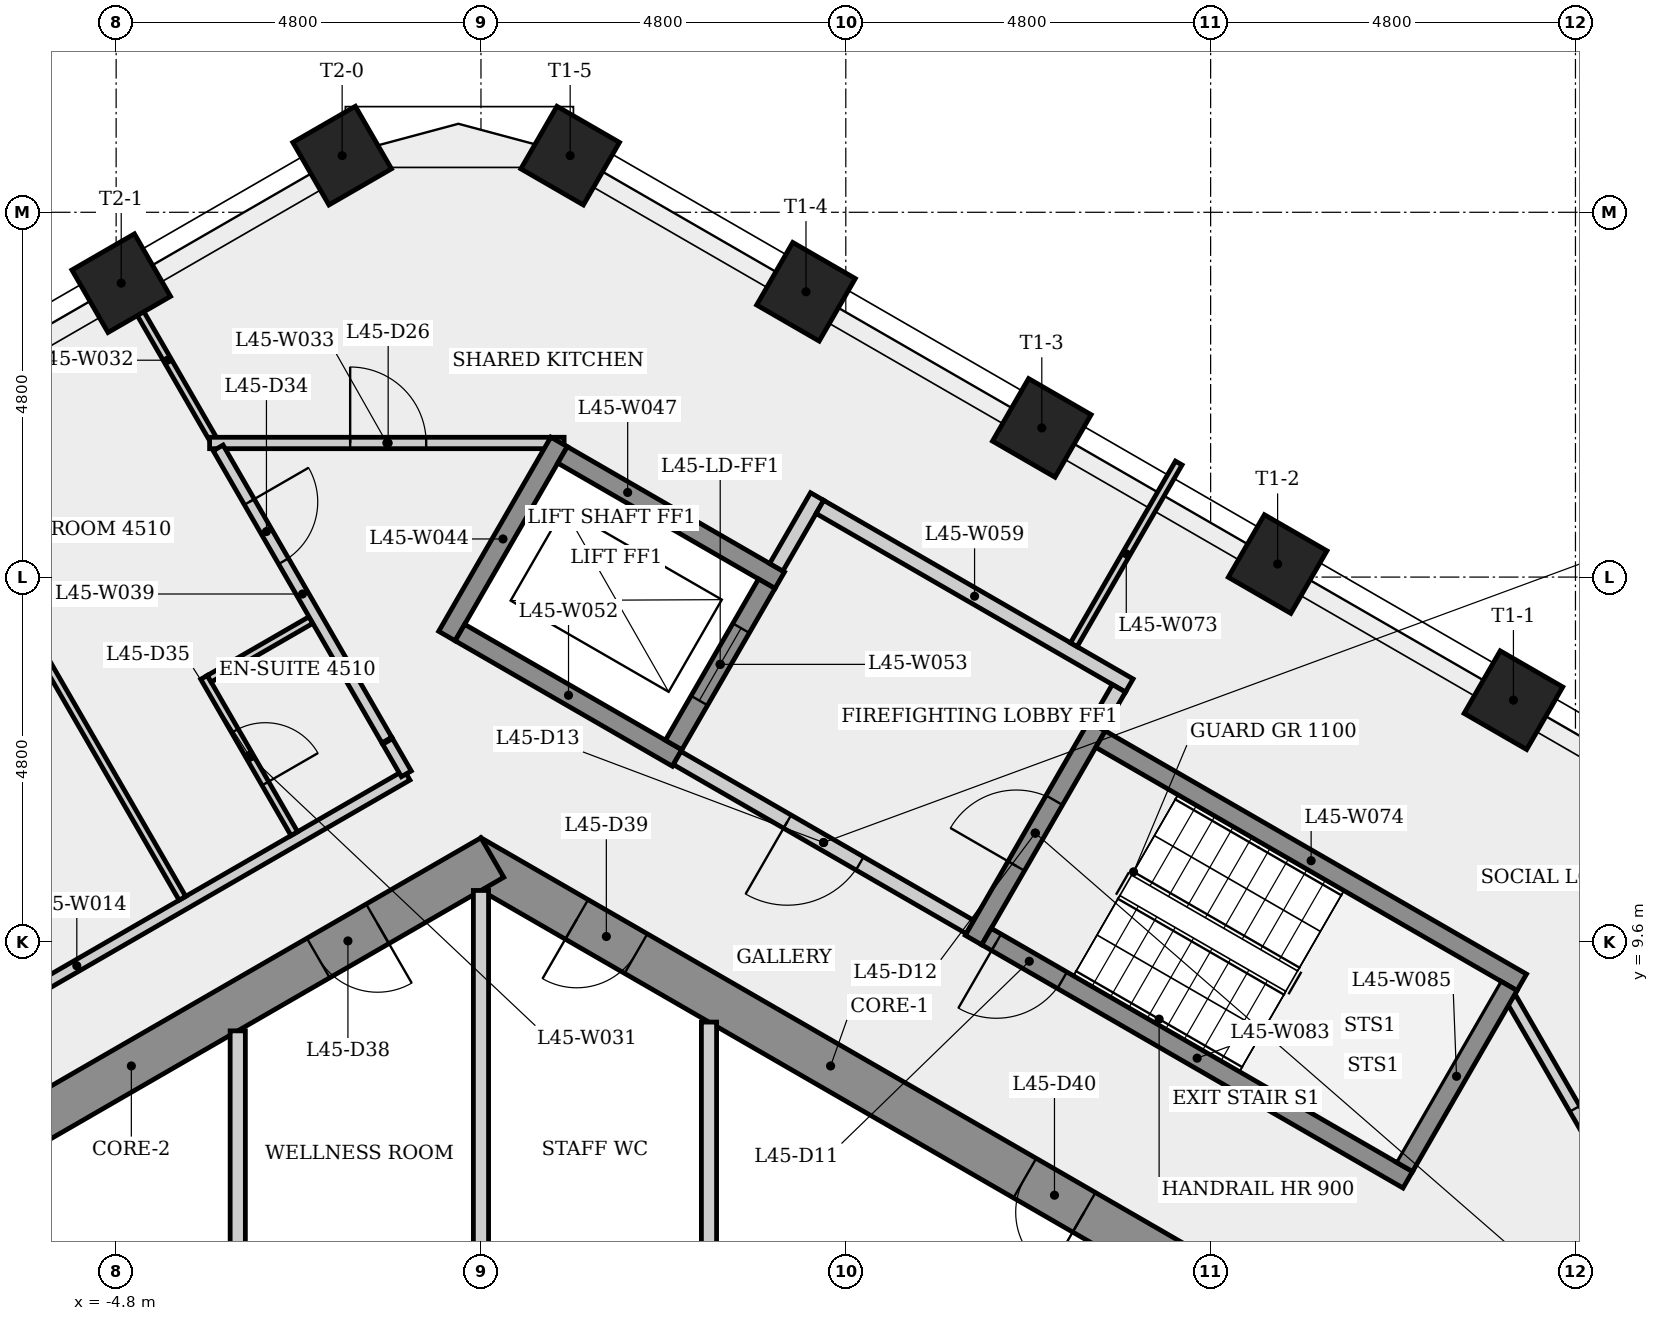
"""IFC4 building model, lengths in metres.
Left out: names, types, materials, properties, quantities, classifications, styles, units other than length and angle.
Written with IfcOpenShell. Run it as: python <this file> out.ifc"""

import sys

from ifc_helpers import new_model, si_unit, direction, frame, frame_2d, origin, origin_2d, place, context, subcontext, project, spatial, rectangle, extrude, element, fill, save


model = new_model("IFC4")
c1 = context("Model", 3, precision=1e-05, world=origin(), true_north=direction((0.0, 1.0)))
c2 = subcontext(c1, "Body", "Model", "MODEL_VIEW")
j1 = project(units=[si_unit("LENGTHUNIT", "METRE"), si_unit("PLANEANGLEUNIT", "RADIAN")], contexts=[c1])
p1 = place(None, origin())
s1 = spatial("IfcSite", under=j1, at=p1, CompositionType="ELEMENT")
p2 = place(p1, origin())
s2 = spatial("IfcBuilding", under=s1, at=p2, CompositionType="ELEMENT")
p3 = place(p2, frame((0.0, 0.0, 169.7)))
s3 = spatial("IfcBuildingStorey", under=s2, at=p3, CompositionType="ELEMENT", Elevation=169.7)
p4 = place(p3, frame((9.35, 5.225, 0.0), z_axis=(0.0, 0.0, 1.0), x_axis=(-0.866023993627, 0.500002442456, 0.0)))
e1 = element("IfcWall", 1, at=p4, inside=s3, PredefinedType="SHEAR", context=c2, shape_type="SweptSolid", body=[
    extrude(rectangle(XDim=10.97, YDim=0.6, at=frame_2d((5.485, 0.0))), origin(), (0.0, 0.0, 1.0), 3.4),
])
p5 = place(p4, frame((8.442, 0.0, 0.0)))
e2 = element("IfcOpeningElement", 2, at=p5, cuts=e1, PredefinedType="OPENING", context=c2, shape_type="SweptSolid", body=[
    extrude(rectangle(XDim=0.9, YDim=2.1, at=frame_2d((0.45, 1.05))), frame((0.0, 0.31, 0.0), z_axis=(0.0, -1.0, 0.0), x_axis=(1.0, 0.0, 0.0)), (0.0, 0.0, 1.0), 0.62),
])
p6 = place(p4, frame((1.634, 0.0, 0.0)))
e3 = element("IfcOpeningElement", 3, at=p6, cuts=e1, PredefinedType="OPENING", context=c2, shape_type="SweptSolid", body=[
    extrude(rectangle(XDim=0.9, YDim=2.1, at=frame_2d((0.45, 1.05))), frame((0.0, 0.31, 0.0), z_axis=(0.0, -1.0, 0.0), x_axis=(1.0, 0.0, 0.0)), (0.0, 0.0, 1.0), 0.62),
])
p7 = place(p3, frame((0.15, 10.71, 0.0), z_axis=(0.0, 0.0, 1.0), x_axis=(-0.866023993627, -0.500002442456, 0.0)))
e4 = element("IfcWall", 4, at=p7, inside=s3, PredefinedType="SHEAR", context=c2, shape_type="SweptSolid", body=[
    extrude(rectangle(XDim=10.97, YDim=0.6, at=frame_2d((5.485, 0.0))), origin(), (0.0, 0.0, 1.0), 3.4),
])
p8 = place(p7, frame((9.201, 0.0, 0.0)))
e5 = element("IfcOpeningElement", 5, at=p8, cuts=e4, PredefinedType="OPENING", context=c2, shape_type="SweptSolid", body=[
    extrude(rectangle(XDim=0.9, YDim=2.1, at=frame_2d((0.45, 1.05))), frame((0.0, 0.31, 0.0), z_axis=(0.0, -1.0, 0.0), x_axis=(1.0, 0.0, 0.0)), (0.0, 0.0, 1.0), 0.62),
])
p9 = place(p7, frame((1.744, 0.0, 0.0)))
e6 = element("IfcOpeningElement", 6, at=p9, cuts=e4, PredefinedType="OPENING", context=c2, shape_type="SweptSolid", body=[
    extrude(rectangle(XDim=0.9, YDim=2.1, at=frame_2d((0.45, 1.05))), frame((0.0, 0.31, 0.0), z_axis=(0.0, -1.0, 0.0), x_axis=(1.0, 0.0, 0.0)), (0.0, 0.0, 1.0), 0.62),
])
for number, where, z_axis, x_axis in (
    (7, (13.584, 12.781, 0.0), (0.0, 0.0, 1.0), (0.5, 0.866, 0.0)),
    (8, (10.481, 14.572, 0.0), (0.0, 0.0, 1.0), (0.5, 0.866, 0.0)),
    (9, (7.379, 16.363, 0.0), (0.0, 0.0, 1.0), (0.5, 0.866, 0.0)),
    (10, (4.276, 18.154, 0.0), (0.0, 0.0, 1.0), (0.5, 0.866, 0.0)),
    (11, (1.174, 19.946, 0.0), (0.0, 0.0, 1.0), (0.5, 0.866, 0.0)),
    (12, (-1.826, 19.946, 0.0), (0.0, 0.0, 1.0), (-0.5, 0.866, 0.0)),
    (13, (-4.733, 18.267, 0.0), (0.0, 0.0, 1.0), (-0.5, 0.866, 0.0)),
):
    element("IfcColumn", number, at=place(p3, frame(where, z_axis=z_axis, x_axis=x_axis)), inside=s3, PredefinedType="COLUMN", context=c2, shape_type="SweptSolid", body=[
        extrude(rectangle(XDim=0.95, YDim=0.95, at=origin_2d()), origin(), (0.0, 0.0, 1.0), 3.4),
    ])
p10 = place(p3, frame((-9.663, 6.776, 0.0), z_axis=(0.0, 0.0, 1.0), x_axis=(0.866026375365, 0.499998317169, 0.0)))
e14 = element("IfcWall", 14, at=p10, inside=s3, PredefinedType="PARTITIONING", context=c2, shape_type="SweptSolid", body=[
    extrude(rectangle(XDim=10.036, YDim=0.15, at=frame_2d((5.018, 0.0))), origin(), (0.0, 0.0, 1.0), 3.05),
])
p11 = place(p10, frame((2.818, 0.0, 0.0)))
e15 = element("IfcOpeningElement", 15, at=p11, cuts=e14, PredefinedType="OPENING", context=c2, shape_type="SweptSolid", body=[
    extrude(rectangle(XDim=1.0, YDim=2.1, at=frame_2d((0.5, 1.05))), frame((0.0, 0.085, 0.0), z_axis=(0.0, -1.0, 0.0), x_axis=(1.0, 0.0, 0.0)), (0.0, 0.0, 1.0), 0.17),
])
p12 = place(p3, frame((-3.928, 10.174, 0.0), z_axis=(0.0, 0.0, 1.0), x_axis=(-0.500011399757, 0.866018822032, 0.0)))
e16 = element("IfcWall", 16, at=p12, inside=s3, PredefinedType="PARTITIONING", context=c2, shape_type="SweptSolid", body=[
    extrude(rectangle(XDim=7.411, YDim=0.1, at=frame_2d((3.706, 0.0))), origin(), (0.0, 0.0, 1.0), 3.05),
])
p13 = place(p3, frame((-3.644, 13.081, 0.0), z_axis=(0.0, 0.0, 1.0), x_axis=(0.499986429846, -0.866033238375, 0.0)))
e17 = element("IfcWall", 17, at=p13, inside=s3, PredefinedType="PARTITIONING", context=c2, shape_type="SweptSolid", body=[
    extrude(rectangle(XDim=2.375, YDim=0.1, at=frame_2d((1.188, 0.0))), origin(), (0.0, 0.0, 1.0), 3.05),
])
p14 = place(p13, frame((0.812, 0.0, 0.0)))
e18 = element("IfcOpeningElement", 18, at=p14, cuts=e17, PredefinedType="OPENING", context=c2, shape_type="SweptSolid", body=[
    extrude(rectangle(XDim=0.8, YDim=2.1, at=frame_2d((0.4, 1.05))), frame((0.0, 0.06, 0.0), z_axis=(0.0, -1.0, 0.0), x_axis=(1.0, 0.0, 0.0)), (0.0, 0.0, 1.0), 0.12),
])
p15 = place(p3, frame((-3.533, 16.229, 0.0), z_axis=(0.0, 0.0, 1.0), x_axis=(-0.499969694265, 0.866042900102, 0.0)))
e19 = element("IfcWall", 19, at=p15, inside=s3, PredefinedType="PARTITIONING", context=c2, shape_type="SweptSolid", body=[
    extrude(rectangle(XDim=2.365, YDim=0.1, at=frame_2d((1.183, 0.0))), origin(), (0.0, 0.0, 1.0), 3.05),
])
p16 = place(p3, frame((-3.57, 16.165, 0.0), z_axis=(0.0, 0.0, 1.0), x_axis=(1.0, 0.0, 0.0)))
e20 = element("IfcWall", 20, at=p16, inside=s3, PredefinedType="PARTITIONING", context=c2, shape_type="SweptSolid", body=[
    extrude(rectangle(XDim=4.664, YDim=0.15, at=frame_2d((2.332, 0.0))), origin(), (0.0, 0.0, 1.0), 3.05),
])
p17 = place(p16, frame((1.849, 0.0, 0.0)))
e21 = element("IfcOpeningElement", 21, at=p17, cuts=e20, PredefinedType="OPENING", context=c2, shape_type="SweptSolid", body=[
    extrude(rectangle(XDim=1.0, YDim=2.1, at=frame_2d((0.5, 1.05))), frame((0.0, 0.085, 0.0), z_axis=(0.0, -1.0, 0.0), x_axis=(1.0, 0.0, 0.0)), (0.0, 0.0, 1.0), 0.17),
])
p18 = place(p3, frame((-3.2, 8.429, 0.0), z_axis=(0.0, 0.0, 1.0), x_axis=(0.0, -1.0, 0.0)))
e22 = element("IfcWall", 22, at=p18, inside=s3, PredefinedType="PARTITIONING", context=c2, shape_type="SweptSolid", body=[
    extrude(rectangle(XDim=3.154, YDim=0.2, at=frame_2d((1.577, 0.0))), origin(), (0.0, 0.0, 1.0), 3.05),
])
p19 = place(p3, frame((-2.237, 13.835, 0.0), z_axis=(0.0, 0.0, 1.0), x_axis=(-0.866056658381, -0.499945861543, 0.0)))
e23 = element("IfcWall", 23, at=p19, inside=s3, PredefinedType="PARTITIONING", context=c2, shape_type="SweptSolid", body=[
    extrude(rectangle(XDim=1.545, YDim=0.1, at=frame_2d((0.772, 0.0))), origin(), (0.0, 0.0, 1.0), 3.05),
])
p20 = place(p3, frame((-3.458, 16.1, 0.0), z_axis=(0.0, 0.0, 1.0), x_axis=(0.500019192393, -0.866014322768, 0.0)))
e24 = element("IfcWall", 24, at=p20, inside=s3, PredefinedType="PARTITIONING", context=c2, shape_type="SweptSolid", body=[
    extrude(rectangle(XDim=4.439, YDim=0.15, at=frame_2d((2.22, 0.0))), origin(), (0.0, 0.0, 1.0), 3.05),
])
p21 = place(p20, frame((0.821, 0.0, 0.0)))
e25 = element("IfcOpeningElement", 25, at=p21, cuts=e24, PredefinedType="OPENING", context=c2, shape_type="SweptSolid", body=[
    extrude(rectangle(XDim=0.9, YDim=2.1, at=frame_2d((0.45, 1.05))), frame((0.0, 0.085, 0.0), z_axis=(0.0, -1.0, 0.0), x_axis=(1.0, 0.0, 0.0)), (0.0, 0.0, 1.0), 0.17),
])
p22 = place(p3, frame((-1.228, 12.238, 0.0), z_axis=(0.0, 0.0, 1.0), x_axis=(0.499765374431, -0.86616082255, 0.0)))
e26 = element("IfcWall", 26, at=p22, inside=s3, PredefinedType="PARTITIONING", context=c2, shape_type="SweptSolid", body=[
    extrude(rectangle(XDim=0.492, YDim=0.15, at=frame_2d((0.246, 0.0))), origin(), (0.0, 0.0, 1.0), 3.05),
])
p23 = place(p3, frame((-0.448, 13.624, 0.0), z_axis=(0.0, 0.0, 1.0), x_axis=(0.500037662692, 0.866003658127, 0.0)))
e27 = element("IfcWall", 27, at=p23, inside=s3, PredefinedType="SHEAR", context=c2, shape_type="SweptSolid", body=[
    extrude(rectangle(XDim=2.95, YDim=0.25, at=frame_2d((1.475, 0.0))), origin(), (0.0, 0.0, 1.0), 3.05),
])
p24 = place(p3, frame((0.0, 10.277, 0.0), z_axis=(0.0, 0.0, 1.0), x_axis=(0.0, -1.0, 0.0)))
e28 = element("IfcWall", 28, at=p24, inside=s3, PredefinedType="PARTITIONING", context=c2, shape_type="SweptSolid", body=[
    extrude(rectangle(XDim=5.002, YDim=0.2, at=frame_2d((2.501, 0.0))), origin(), (0.0, 0.0, 1.0), 3.05),
])
for number, where, z_axis, x_axis in (
    (29, (1.073, 16.008, 0.0), (0.0, 0.0, 1.0), (0.866, -0.5, 0.0)),
    (30, (2.581, 12.02, 0.0), (0.0, 0.0, 1.0), (-0.866, 0.5, 0.0)),
):
    element("IfcWall", number, at=place(p3, frame(where, z_axis=z_axis, x_axis=x_axis)), inside=s3, PredefinedType="SHEAR", context=c2, shape_type="SweptSolid", body=[
        extrude(rectangle(XDim=3.3, YDim=0.25, at=frame_2d((1.65, 0.0))), origin(), (0.0, 0.0, 1.0), 3.05),
    ])
p25 = place(p3, frame((2.535, 12.191, 0.0), z_axis=(0.0, 0.0, 1.0), x_axis=(0.500061746146, 0.865989751695, 0.0)))
e31 = element("IfcWall", 31, at=p25, inside=s3, PredefinedType="SHEAR", context=c2, shape_type="SweptSolid", body=[
    extrude(rectangle(XDim=2.45, YDim=0.25, at=frame_2d((1.225, 0.0))), origin(), (0.0, 0.0, 1.0), 3.4),
])
p26 = place(p25, frame((0.675, 0.0, 0.0)))
e32 = element("IfcOpeningElement", 32, at=p26, cuts=e31, PredefinedType="OPENING", context=c2, shape_type="SweptSolid", body=[
    extrude(rectangle(XDim=1.1, YDim=2.1, at=frame_2d((0.55, 1.05))), frame((0.0, 0.135, 0.0), z_axis=(0.0, -1.0, 0.0), x_axis=(1.0, 0.0, 0.0)), (0.0, 0.0, 1.0), 0.27),
])
p27 = place(p3, frame((3.0, 8.545, 0.0), z_axis=(0.0, 0.0, 1.0), x_axis=(0.0, -1.0, 0.0)))
e33 = element("IfcWall", 33, at=p27, inside=s3, PredefinedType="PARTITIONING", context=c2, shape_type="SweptSolid", body=[
    extrude(rectangle(XDim=3.27, YDim=0.2, at=frame_2d((1.635, 0.0))), origin(), (0.0, 0.0, 1.0), 3.05),
])
p28 = place(p3, frame((3.885, 14.529, 0.0), z_axis=(0.0, 0.0, 1.0), x_axis=(0.499997628298, 0.866026773083, 0.0)))
e34 = element("IfcWall", 34, at=p28, inside=s3, PredefinedType="PARTITIONING", context=c2, shape_type="SweptSolid", body=[
    extrude(rectangle(XDim=1.075, YDim=0.2, at=frame_2d((0.538, 0.0))), origin(), (0.0, 0.0, 1.0), 3.05),
])
p29 = place(p3, frame((4.459, 15.323, 0.0), z_axis=(0.0, 0.0, 1.0), x_axis=(0.866016039709, -0.500016218704, 0.0)))
e35 = element("IfcWall", 35, at=p29, inside=s3, PredefinedType="PARTITIONING", context=c2, shape_type="SweptSolid", body=[
    extrude(rectangle(XDim=4.7, YDim=0.2, at=frame_2d((2.35, 0.0))), origin(), (0.0, 0.0, 1.0), 3.05),
])
p30 = place(p3, frame((6.435, 9.795, 0.0), z_axis=(0.0, 0.0, 1.0), x_axis=(-0.866012907634, 0.500021643343, 0.0)))
e36 = element("IfcWall", 36, at=p30, inside=s3, PredefinedType="PARTITIONING", context=c2, shape_type="SweptSolid", body=[
    extrude(rectangle(XDim=4.45, YDim=0.2, at=frame_2d((2.225, 0.0))), origin(), (0.0, 0.0, 1.0), 3.05),
])
p31 = place(p30, frame((1.675, 0.0, 0.0)))
e37 = element("IfcOpeningElement", 37, at=p31, cuts=e36, PredefinedType="OPENING", context=c2, shape_type="SweptSolid", body=[
    extrude(rectangle(XDim=1.1, YDim=2.1, at=frame_2d((0.55, 1.05))), frame((0.0, 0.11, 0.0), z_axis=(0.0, -1.0, 0.0), x_axis=(1.0, 0.0, 0.0)), (0.0, 0.0, 1.0), 0.22),
])
p32 = place(p3, frame((6.48, 9.624, 0.0), z_axis=(0.0, 0.0, 1.0), x_axis=(0.500017246033, 0.866015446554, 0.0)))
e38 = element("IfcWall", 38, at=p32, inside=s3, PredefinedType="SHEAR", context=c2, shape_type="SweptSolid", body=[
    extrude(rectangle(XDim=3.25, YDim=0.25, at=frame_2d((1.625, 0.0))), origin(), (0.0, 0.0, 1.0), 3.05),
])
p33 = place(p32, frame((1.125, 0.0, 0.0)))
e39 = element("IfcOpeningElement", 39, at=p33, cuts=e38, PredefinedType="OPENING", context=c2, shape_type="SweptSolid", body=[
    extrude(rectangle(XDim=1.0, YDim=2.1, at=frame_2d((0.5, 1.05))), frame((0.0, 0.135, 0.0), z_axis=(0.0, -1.0, 0.0), x_axis=(1.0, 0.0, 0.0)), (0.0, 0.0, 1.0), 0.27),
])
p34 = place(p3, frame((7.8, 13.51, 0.0), z_axis=(0.0, 0.0, 1.0), x_axis=(0.500000584575, 0.86602506628, 0.0)))
e40 = element("IfcWall", 40, at=p34, inside=s3, PredefinedType="PARTITIONING", context=c2, shape_type="SweptSolid", body=[
    extrude(rectangle(XDim=2.761, YDim=0.1, at=frame_2d((1.38, 0.0))), origin(), (0.0, 0.0, 1.0), 3.05),
])
p35 = place(p3, frame((8.151, 12.268, 0.0), z_axis=(0.0, 0.0, 1.0), x_axis=(0.866025499775, -0.499999833739, 0.0)))
e41 = element("IfcWall", 41, at=p35, inside=s3, PredefinedType="SHEAR", context=c2, shape_type="SweptSolid", body=[
    extrude(rectangle(XDim=6.4, YDim=0.25, at=frame_2d((3.2, 0.0))), origin(), (0.0, 0.0, 1.0), 3.05),
])
p36 = place(p3, frame((8.393, 12.937, 0.0), z_axis=(0.0, 0.0, 1.0), x_axis=(-0.500065409566, -0.86598763626, 0.0)))
e42 = element("IfcWall", 42, at=p36, inside=s3, PredefinedType="PARTITIONING", context=c2, shape_type="SweptSolid", body=[
    extrude(rectangle(XDim=0.575, YDim=0.2, at=frame_2d((0.288, 0.0))), origin(), (0.0, 0.0, 1.0), 3.05),
])
p37 = place(p3, frame((12.194, 6.47, 0.0), z_axis=(0.0, 0.0, 1.0), x_axis=(-0.866025499775, 0.499999833739, 0.0)))
e43 = element("IfcWall", 43, at=p37, inside=s3, PredefinedType="SHEAR", context=c2, shape_type="SweptSolid", body=[
    extrude(rectangle(XDim=6.4, YDim=0.25, at=frame_2d((3.2, 0.0))), origin(), (0.0, 0.0, 1.0), 3.05),
])
p38 = place(p37, frame((5.25, 0.0, 0.0)))
e44 = element("IfcOpeningElement", 44, at=p38, cuts=e43, PredefinedType="OPENING", context=c2, shape_type="SweptSolid", body=[
    extrude(rectangle(XDim=1.0, YDim=2.1, at=frame_2d((0.5, 1.05))), frame((0.0, 0.135, 0.0), z_axis=(0.0, -1.0, 0.0), x_axis=(1.0, 0.0, 0.0)), (0.0, 0.0, 1.0), 0.27),
])
p39 = place(p3, frame((13.552, 8.856, 0.0), z_axis=(0.0, 0.0, 1.0), x_axis=(0.500027009065, -0.866009809532, 0.0)))
e45 = element("IfcWall", 45, at=p39, inside=s3, PredefinedType="PARTITIONING", context=c2, shape_type="SweptSolid", body=[
    extrude(rectangle(XDim=4.464, YDim=0.15, at=frame_2d((2.232, 0.0))), origin(), (0.0, 0.0, 1.0), 3.05),
])
p40 = place(p39, frame((1.677, 0.0, 0.0)))
e46 = element("IfcOpeningElement", 46, at=p40, cuts=e45, PredefinedType="OPENING", context=c2, shape_type="SweptSolid", body=[
    extrude(rectangle(XDim=1.0, YDim=2.1, at=frame_2d((0.5, 1.05))), frame((0.0, 0.085, 0.0), z_axis=(0.0, -1.0, 0.0), x_axis=(1.0, 0.0, 0.0)), (0.0, 0.0, 1.0), 0.17),
])
p41 = place(p3, frame((12.148, 6.641, 0.0), z_axis=(0.0, 0.0, 1.0), x_axis=(0.500034990121, 0.866005201286, 0.0)))
e47 = element("IfcWall", 47, at=p41, inside=s3, PredefinedType="SHEAR", context=c2, shape_type="SweptSolid", body=[
    extrude(rectangle(XDim=2.75, YDim=0.25, at=frame_2d((1.375, 0.0))), origin(), (0.0, 0.0, 1.0), 3.05),
])
p42 = place(p38, origin())
e48 = element("IfcDoor", 48, at=p42, inside=s3, OperationType="SINGLE_SWING_RIGHT", PredefinedType="DOOR", context=c2, shape_type="SweptSolid", body=[
    extrude(rectangle(XDim=1.0, YDim=2.1, at=frame_2d((0.5, 1.05))), frame((0.0, 0.025, 0.0), z_axis=(0.0, -1.0, 0.0), x_axis=(1.0, 0.0, 0.0)), (0.0, 0.0, 1.0), 0.05),
])
fill(e44, e48)
p43 = place(p33, origin())
e49 = element("IfcDoor", 49, at=p43, inside=s3, OperationType="SINGLE_SWING_LEFT", PredefinedType="DOOR", context=c2, shape_type="SweptSolid", body=[
    extrude(rectangle(XDim=1.0, YDim=2.1, at=frame_2d((0.5, 1.05))), frame((0.0, 0.025, 0.0), z_axis=(0.0, -1.0, 0.0), x_axis=(1.0, 0.0, 0.0)), (0.0, 0.0, 1.0), 0.05),
])
fill(e39, e49)
p44 = place(p31, origin())
e50 = element("IfcDoor", 50, at=p44, inside=s3, OperationType="SINGLE_SWING_RIGHT", PredefinedType="DOOR", context=c2, shape_type="SweptSolid", body=[
    extrude(rectangle(XDim=1.1, YDim=2.1, at=frame_2d((0.55, 1.05))), frame((0.0, 0.025, 0.0), z_axis=(0.0, -1.0, 0.0), x_axis=(1.0, 0.0, 0.0)), (0.0, 0.0, 1.0), 0.05),
])
fill(e37, e50)
p45 = place(p26, origin())
e51 = element("IfcDoor", 51, at=p45, inside=s3, OperationType="SLIDING_TO_LEFT", PredefinedType="DOOR", context=c2, shape_type="SweptSolid", body=[
    extrude(rectangle(XDim=1.1, YDim=2.1, at=frame_2d((0.55, 1.05))), frame((0.0, 0.025, 0.0), z_axis=(0.0, -1.0, 0.0), x_axis=(1.0, 0.0, 0.0)), (0.0, 0.0, 1.0), 0.05),
])
fill(e32, e51)
p46 = place(p40, origin())
e52 = element("IfcDoor", 52, at=p46, inside=s3, OperationType="SINGLE_SWING_RIGHT", PredefinedType="DOOR", context=c2, shape_type="SweptSolid", body=[
    extrude(rectangle(XDim=1.0, YDim=2.1, at=frame_2d((0.5, 1.05))), frame((0.0, 0.025, 0.0), z_axis=(0.0, -1.0, 0.0), x_axis=(1.0, 0.0, 0.0)), (0.0, 0.0, 1.0), 0.05),
])
fill(e46, e52)
p47 = place(p17, origin())
e53 = element("IfcDoor", 53, at=p47, inside=s3, OperationType="SINGLE_SWING_LEFT", PredefinedType="DOOR", context=c2, shape_type="SweptSolid", body=[
    extrude(rectangle(XDim=1.0, YDim=2.1, at=frame_2d((0.5, 1.05))), frame((0.0, 0.025, 0.0), z_axis=(0.0, -1.0, 0.0), x_axis=(1.0, 0.0, 0.0)), (0.0, 0.0, 1.0), 0.05),
])
fill(e21, e53)
p48 = place(p21, origin())
e54 = element("IfcDoor", 54, at=p48, inside=s3, OperationType="SINGLE_SWING_LEFT", PredefinedType="DOOR", context=c2, shape_type="SweptSolid", body=[
    extrude(rectangle(XDim=0.9, YDim=2.1, at=frame_2d((0.45, 1.05))), frame((0.0, 0.025, 0.0), z_axis=(0.0, -1.0, 0.0), x_axis=(1.0, 0.0, 0.0)), (0.0, 0.0, 1.0), 0.05),
])
fill(e25, e54)
p49 = place(p14, origin())
e55 = element("IfcDoor", 55, at=p49, inside=s3, OperationType="SINGLE_SWING_RIGHT", PredefinedType="DOOR", context=c2, shape_type="SweptSolid", body=[
    extrude(rectangle(XDim=0.8, YDim=2.1, at=frame_2d((0.4, 1.05))), frame((0.0, 0.025, 0.0), z_axis=(0.0, -1.0, 0.0), x_axis=(1.0, 0.0, 0.0)), (0.0, 0.0, 1.0), 0.05),
])
fill(e18, e55)
p50 = place(p9, origin())
e56 = element("IfcDoor", 56, at=p50, inside=s3, OperationType="SINGLE_SWING_LEFT", PredefinedType="DOOR", context=c2, shape_type="SweptSolid", body=[
    extrude(rectangle(XDim=0.9, YDim=2.1, at=frame_2d((0.45, 1.05))), frame((0.0, 0.025, 0.0), z_axis=(0.0, -1.0, 0.0), x_axis=(1.0, 0.0, 0.0)), (0.0, 0.0, 1.0), 0.05),
])
fill(e6, e56)
p51 = place(p5, origin())
e57 = element("IfcDoor", 57, at=p51, inside=s3, OperationType="SINGLE_SWING_RIGHT", PredefinedType="DOOR", context=c2, shape_type="SweptSolid", body=[
    extrude(rectangle(XDim=0.9, YDim=2.1, at=frame_2d((0.45, 1.05))), frame((0.0, 0.025, 0.0), z_axis=(0.0, -1.0, 0.0), x_axis=(1.0, 0.0, 0.0)), (0.0, 0.0, 1.0), 0.05),
])
fill(e2, e57)
p52 = place(p6, origin())
e58 = element("IfcDoor", 58, at=p52, inside=s3, OperationType="SINGLE_SWING_LEFT", PredefinedType="DOOR", context=c2, shape_type="SweptSolid", body=[
    extrude(rectangle(XDim=0.9, YDim=2.1, at=frame_2d((0.45, 1.05))), frame((0.0, 0.025, 0.0), z_axis=(0.0, -1.0, 0.0), x_axis=(1.0, 0.0, 0.0)), (0.0, 0.0, 1.0), 0.05),
])
fill(e3, e58)
save(model, sys.argv[1])
